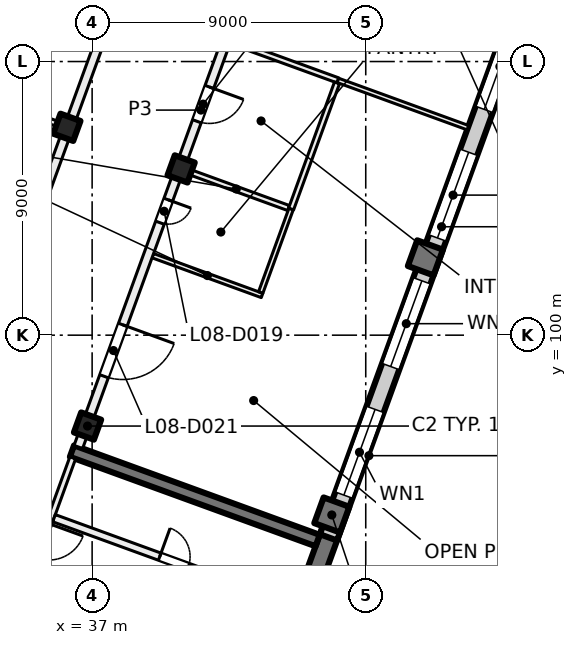
"""IFC4 building model, lengths in metres.
Left out: names, types, materials, properties, quantities, classifications, styles, units other than length and angle.
Written with IfcOpenShell. Run it as: python <this file> out.ifc"""

import sys

from ifc_helpers import new_model, si_unit, direction, frame, frame_2d, origin, origin_2d, place, context, subcontext, project, spatial, rectangle, extrude, element, fill, save


model = new_model("IFC4")
c1 = context("Model", 3, precision=1e-05, world=origin(), true_north=direction((0.0, 1.0)))
c2 = subcontext(c1, "Body", "Model", "MODEL_VIEW")
j1 = project(units=[si_unit("LENGTHUNIT", "METRE"), si_unit("PLANEANGLEUNIT", "RADIAN")], contexts=[c1])
p1 = place(None, origin())
s1 = spatial("IfcSite", under=j1, at=p1, CompositionType="ELEMENT")
p2 = place(p1, origin())
s2 = spatial("IfcBuilding", under=s1, at=p2, CompositionType="ELEMENT")
p3 = place(p2, frame((0.0, 0.0, 39.5)))
s3 = spatial("IfcBuildingStorey", under=s2, at=p3, CompositionType="ELEMENT", Elevation=39.5)
for number, where, z_axis, x_axis in (
    (1, (39.927, 105.468, 0.0), (0.0, 0.0, 1.0), (-0.342, -0.94, 0.0)),
    (2, (36.849, 97.011, 0.0), (0.0, 0.0, 1.0), (-0.342, -0.94, 0.0)),
    (3, (36.169, 106.836, 0.0), (0.0, 0.0, 1.0), (-0.342, -0.94, 0.0)),
):
    element("IfcColumn", number, at=place(p3, frame(where, z_axis=z_axis, x_axis=x_axis)), inside=s3, PredefinedType="COLUMN", context=c2, shape_type="SweptSolid", body=[
        extrude(rectangle(XDim=0.7, YDim=0.7, at=origin_2d()), origin(), (0.0, 0.0, 1.0), 4.0),
    ])
for number, where, z_axis, x_axis in (
    (4, (47.962, 102.544, 0.0), (0.0, 0.0, 1.0), (-0.342, -0.94, 0.0)),
    (5, (44.884, 94.087, 0.0), (0.0, 0.0, 1.0), (-0.342, -0.94, 0.0)),
):
    element("IfcColumn", number, at=place(p3, frame(where, z_axis=z_axis, x_axis=x_axis)), inside=s3, PredefinedType="COLUMN", context=c2, shape_type="SweptSolid", body=[
        extrude(rectangle(XDim=0.9, YDim=0.9, at=origin_2d()), origin(), (0.0, 0.0, 1.0), 4.0),
    ])
p4 = place(p3, frame((41.827, 85.249, 0.0), z_axis=(0.0, 0.0, 1.0), x_axis=(0.342016162452, 0.939694069696, 0.0)))
e6 = element("IfcWall", 6, at=p4, inside=s3, PredefinedType="SHEAR", context=c2, shape_type="SweptSolid", body=[
    extrude(rectangle(XDim=8.9, YDim=0.6, at=frame_2d((4.45, 0.0))), origin(), (0.0, 0.0, 1.0), 4.0),
])
p5 = place(p3, frame((44.418, 93.245, 0.0), z_axis=(0.0, 0.0, 1.0), x_axis=(-0.93969060187, 0.342025690201, 0.0)))
e7 = element("IfcWall", 7, at=p5, inside=s3, PredefinedType="SHEAR", context=c2, shape_type="SweptSolid", body=[
    extrude(rectangle(XDim=8.6, YDim=0.4, at=frame_2d((4.3, 0.0))), origin(), (0.0, 0.0, 1.0), 4.0),
])
p6 = place(p3, frame((52.212, 113.783, 0.0), z_axis=(0.0, 0.0, 1.0), x_axis=(-0.34202521188, -0.939690775968, 0.0)))
e8 = element("IfcWall", 8, at=p6, inside=s3, PredefinedType="SOLIDWALL", context=c2, shape_type="SweptSolid", body=[
    extrude(rectangle(XDim=21.745, YDim=0.6, at=frame_2d((10.873, 0.0))), origin(), (0.0, 0.0, 1.0), 3.625),
])
p7 = place(p6, frame((3.765, 0.0, 0.9)))
e9 = element("IfcOpeningElement", 9, at=p7, cuts=e8, PredefinedType="OPENING", context=c2, shape_type="SweptSolid", body=[
    extrude(rectangle(XDim=3.0, YDim=2.4, at=frame_2d((1.5, 1.2))), frame((0.0, 0.31, 0.0), z_axis=(0.0, -1.0, 0.0), x_axis=(1.0, 0.0, 0.0)), (0.0, 0.0, 1.0), 0.62),
])
p8 = place(p6, frame((8.265, 0.0, 0.9)))
e10 = element("IfcOpeningElement", 10, at=p8, cuts=e8, PredefinedType="OPENING", context=c2, shape_type="SweptSolid", body=[
    extrude(rectangle(XDim=3.0, YDim=2.4, at=frame_2d((1.5, 1.2))), frame((0.0, 0.31, 0.0), z_axis=(0.0, -1.0, 0.0), x_axis=(1.0, 0.0, 0.0)), (0.0, 0.0, 1.0), 0.62),
])
p9 = place(p6, frame((12.765, 0.0, 0.9)))
e11 = element("IfcOpeningElement", 11, at=p9, cuts=e8, PredefinedType="OPENING", context=c2, shape_type="SweptSolid", body=[
    extrude(rectangle(XDim=3.0, YDim=2.4, at=frame_2d((1.5, 1.2))), frame((0.0, 0.31, 0.0), z_axis=(0.0, -1.0, 0.0), x_axis=(1.0, 0.0, 0.0)), (0.0, 0.0, 1.0), 0.62),
])
p10 = place(p6, frame((17.265, 0.0, 0.9)))
e12 = element("IfcOpeningElement", 12, at=p10, cuts=e8, PredefinedType="OPENING", context=c2, shape_type="SweptSolid", body=[
    extrude(rectangle(XDim=3.0, YDim=2.4, at=frame_2d((1.5, 1.2))), frame((0.0, 0.31, 0.0), z_axis=(0.0, -1.0, 0.0), x_axis=(1.0, 0.0, 0.0)), (0.0, 0.0, 1.0), 0.62),
])
p11 = place(p3, frame((24.666, 100.669, 0.0), z_axis=(0.0, 0.0, 1.0), x_axis=(0.34201964167, 0.939692803373, 0.0)))
e13 = element("IfcWall", 13, at=p11, inside=s3, PredefinedType="SOLIDWALL", context=c2, shape_type="SweptSolid", body=[
    extrude(rectangle(XDim=32.884, YDim=0.6, at=frame_2d((16.442, 0.0))), origin(), (0.0, 0.0, 1.0), 3.625),
])
p12 = place(p11, frame((1.48, 0.0, 0.9)))
e14 = element("IfcOpeningElement", 14, at=p12, cuts=e13, PredefinedType="OPENING", context=c2, shape_type="SweptSolid", body=[
    extrude(rectangle(XDim=3.0, YDim=2.4, at=frame_2d((1.5, 1.2))), frame((0.0, 0.31, 0.0), z_axis=(0.0, -1.0, 0.0), x_axis=(1.0, 0.0, 0.0)), (0.0, 0.0, 1.0), 0.62),
])
p13 = place(p11, frame((5.98, 0.0, 0.9)))
e15 = element("IfcOpeningElement", 15, at=p13, cuts=e13, PredefinedType="OPENING", context=c2, shape_type="SweptSolid", body=[
    extrude(rectangle(XDim=3.0, YDim=2.4, at=frame_2d((1.5, 1.2))), frame((0.0, 0.31, 0.0), z_axis=(0.0, -1.0, 0.0), x_axis=(1.0, 0.0, 0.0)), (0.0, 0.0, 1.0), 0.62),
])
p14 = place(p11, frame((10.48, 0.0, 0.9)))
e16 = element("IfcOpeningElement", 16, at=p14, cuts=e13, PredefinedType="OPENING", context=c2, shape_type="SweptSolid", body=[
    extrude(rectangle(XDim=3.0, YDim=2.4, at=frame_2d((1.5, 1.2))), frame((0.0, 0.31, 0.0), z_axis=(0.0, -1.0, 0.0), x_axis=(1.0, 0.0, 0.0)), (0.0, 0.0, 1.0), 0.62),
])
p15 = place(p11, frame((14.98, 0.0, 0.9)))
e17 = element("IfcOpeningElement", 17, at=p15, cuts=e13, PredefinedType="OPENING", context=c2, shape_type="SweptSolid", body=[
    extrude(rectangle(XDim=3.0, YDim=2.4, at=frame_2d((1.5, 1.2))), frame((0.0, 0.31, 0.0), z_axis=(0.0, -1.0, 0.0), x_axis=(1.0, 0.0, 0.0)), (0.0, 0.0, 1.0), 0.62),
])
p16 = place(p11, frame((19.48, 0.0, 0.9)))
e18 = element("IfcOpeningElement", 18, at=p16, cuts=e13, PredefinedType="OPENING", context=c2, shape_type="SweptSolid", body=[
    extrude(rectangle(XDim=3.0, YDim=2.4, at=frame_2d((1.5, 1.2))), frame((0.0, 0.31, 0.0), z_axis=(0.0, -1.0, 0.0), x_axis=(1.0, 0.0, 0.0)), (0.0, 0.0, 1.0), 0.62),
])
p17 = place(p11, frame((23.98, 0.0, 0.9)))
e19 = element("IfcOpeningElement", 19, at=p17, cuts=e13, PredefinedType="OPENING", context=c2, shape_type="SweptSolid", body=[
    extrude(rectangle(XDim=3.0, YDim=2.4, at=frame_2d((1.5, 1.2))), frame((0.0, 0.31, 0.0), z_axis=(0.0, -1.0, 0.0), x_axis=(1.0, 0.0, 0.0)), (0.0, 0.0, 1.0), 0.62),
])
p18 = place(p11, frame((28.48, 0.0, 0.9)))
e20 = element("IfcOpeningElement", 20, at=p18, cuts=e13, PredefinedType="OPENING", context=c2, shape_type="SweptSolid", body=[
    extrude(rectangle(XDim=3.0, YDim=2.4, at=frame_2d((1.5, 1.2))), frame((0.0, 0.31, 0.0), z_axis=(0.0, -1.0, 0.0), x_axis=(1.0, 0.0, 0.0)), (0.0, 0.0, 1.0), 0.62),
])
p19 = place(p3, frame((36.362, 95.964, 0.0), z_axis=(0.0, 0.0, 1.0), x_axis=(-0.341995824804, -0.939701471648, 0.0)))
e21 = element("IfcWall", 21, at=p19, inside=s3, PredefinedType="PARTITIONING", context=c2, shape_type="SweptSolid", body=[
    extrude(rectangle(XDim=3.8, YDim=0.2, at=frame_2d((1.9, 0.0))), origin(), (0.0, 0.0, 1.0), 3.625),
])
p20 = place(p19, frame((2.3, 0.0, 0.0)))
e22 = element("IfcOpeningElement", 22, at=p20, cuts=e21, PredefinedType="OPENING", context=c2, shape_type="SweptSolid", body=[
    extrude(rectangle(XDim=1.2, YDim=2.1, at=frame_2d((0.6, 1.05))), frame((0.0, 0.11, 0.0), z_axis=(0.0, -1.0, 0.0), x_axis=(1.0, 0.0, 0.0)), (0.0, 0.0, 1.0), 0.22),
])
p21 = place(p3, frame((35.19, 92.453, 0.0), z_axis=(0.0, 0.0, 1.0), x_axis=(0.939691552312, -0.342023078919, 0.0)))
e23 = element("IfcWall", 23, at=p21, inside=s3, PredefinedType="PARTITIONING", context=c2, shape_type="SweptSolid", body=[
    extrude(rectangle(XDim=8.4, YDim=0.2, at=frame_2d((4.2, 0.0))), origin(), (0.0, 0.0, 1.0), 3.625),
])
p22 = place(p21, frame((5.25, 0.0, 0.0)))
e24 = element("IfcOpeningElement", 24, at=p22, cuts=e23, PredefinedType="OPENING", context=c2, shape_type="SweptSolid", body=[
    extrude(rectangle(XDim=1.5, YDim=2.1, at=frame_2d((0.75, 1.05))), frame((0.0, 0.11, 0.0), z_axis=(0.0, -1.0, 0.0), x_axis=(1.0, 0.0, 0.0)), (0.0, 0.0, 1.0), 0.22),
])
p23 = place(p3, frame((35.746, 93.98, 0.0), z_axis=(0.0, 0.0, 1.0), x_axis=(0.939691552312, -0.342023078919, 0.0)))
e25 = element("IfcWall", 25, at=p23, inside=s3, PredefinedType="PARTITIONING", context=c2, shape_type="SweptSolid", body=[
    extrude(rectangle(XDim=8.4, YDim=0.25, at=frame_2d((4.2, 0.0))), origin(), (0.0, 0.0, 1.0), 3.625),
])
p24 = place(p23, frame((3.7, 0.0, 0.0)))
e26 = element("IfcOpeningElement", 26, at=p24, cuts=e25, PredefinedType="OPENING", context=c2, shape_type="SweptSolid", body=[
    extrude(rectangle(XDim=1.0, YDim=2.1, at=frame_2d((0.5, 1.05))), frame((0.0, 0.135, 0.0), z_axis=(0.0, -1.0, 0.0), x_axis=(1.0, 0.0, 0.0)), (0.0, 0.0, 1.0), 0.27),
])
p25 = place(p3, frame((28.275, 109.709, 0.0), z_axis=(0.0, 0.0, 1.0), x_axis=(0.939697205528, -0.342007546586, 0.0)))
e27 = element("IfcWall", 27, at=p25, inside=s3, PredefinedType="PARTITIONING", context=c2, shape_type="SweptSolid", body=[
    extrude(rectangle(XDim=8.301, YDim=0.175, at=frame_2d((4.15, 0.0))), origin(), (0.0, 0.0, 1.0), 3.625),
])
p26 = place(p3, frame((32.881, 97.657, 0.0), z_axis=(0.0, 0.0, 1.0), x_axis=(0.342017360004, 0.939693633828, 0.0)))
e28 = element("IfcWall", 28, at=p26, inside=s3, PredefinedType="PARTITIONING", context=c2, shape_type="SweptSolid", body=[
    extrude(rectangle(XDim=34.516, YDim=0.3, at=frame_2d((17.258, 0.0))), origin(), (0.0, 0.0, 1.0), 3.625),
])
p27 = place(p26, frame((4.275, 0.0, 0.0)))
e29 = element("IfcOpeningElement", 29, at=p27, cuts=e28, PredefinedType="OPENING", context=c2, shape_type="SweptSolid", body=[
    extrude(rectangle(XDim=1.2, YDim=2.1, at=frame_2d((0.6, 1.05))), frame((0.0, 0.16, 0.0), z_axis=(0.0, -1.0, 0.0), x_axis=(1.0, 0.0, 0.0)), (0.0, 0.0, 1.0), 0.32),
])
p28 = place(p26, frame((16.0, 0.0, 0.0)))
e30 = element("IfcOpeningElement", 30, at=p28, cuts=e28, PredefinedType="OPENING", context=c2, shape_type="SweptSolid", body=[
    extrude(rectangle(XDim=1.0, YDim=2.1, at=frame_2d((0.5, 1.05))), frame((0.0, 0.16, 0.0), z_axis=(0.0, -1.0, 0.0), x_axis=(1.0, 0.0, 0.0)), (0.0, 0.0, 1.0), 0.32),
])
p29 = place(p26, frame((21.5, 0.0, 0.0)))
e31 = element("IfcOpeningElement", 31, at=p29, cuts=e28, PredefinedType="OPENING", context=c2, shape_type="SweptSolid", body=[
    extrude(rectangle(XDim=1.0, YDim=2.1, at=frame_2d((0.5, 1.05))), frame((0.0, 0.16, 0.0), z_axis=(0.0, -1.0, 0.0), x_axis=(1.0, 0.0, 0.0)), (0.0, 0.0, 1.0), 0.32),
])
p30 = place(p3, frame((41.561, 109.663, 0.0), z_axis=(0.0, 0.0, 1.0), x_axis=(0.939610777088, -0.34224492338, 0.0)))
e32 = element("IfcWall", 32, at=p30, inside=s3, PredefinedType="PARTITIONING", context=c2, shape_type="SweptSolid", body=[
    extrude(rectangle(XDim=3.749, YDim=0.175, at=frame_2d((1.875, 0.0))), origin(), (0.0, 0.0, 1.0), 3.625),
])
p31 = place(p3, frame((42.589, 101.306, 0.0), z_axis=(0.0, 0.0, 1.0), x_axis=(-0.939610657605, 0.342245251415, 0.0)))
e33 = element("IfcWall", 33, at=p31, inside=s3, PredefinedType="PARTITIONING", context=c2, shape_type="SweptSolid", body=[
    extrude(rectangle(XDim=3.825, YDim=0.15, at=frame_2d((1.913, 0.0))), origin(), (0.0, 0.0, 1.0), 3.625),
])
p32 = place(p3, frame((43.463, 104.181, 0.0), z_axis=(0.0, 0.0, 1.0), x_axis=(-0.939655178262, 0.342122998299, 0.0)))
e34 = element("IfcWall", 34, at=p32, inside=s3, PredefinedType="PARTITIONING", context=c2, shape_type="SweptSolid", body=[
    extrude(rectangle(XDim=3.663, YDim=0.175, at=frame_2d((1.832, 0.0))), origin(), (0.0, 0.0, 1.0), 3.625),
])
p33 = place(p3, frame((43.545, 104.151, 0.0), z_axis=(0.0, 0.0, 1.0), x_axis=(-0.341877092744, -0.93974467461, 0.0)))
e35 = element("IfcWall", 35, at=p33, inside=s3, PredefinedType="PARTITIONING", context=c2, shape_type="SweptSolid", body=[
    extrude(rectangle(XDim=2.925, YDim=0.15, at=frame_2d((1.462, 0.0))), origin(), (0.0, 0.0, 1.0), 3.625),
])
p34 = place(p3, frame((44.612, 118.483, 0.0), z_axis=(0.0, 0.0, 1.0), x_axis=(-0.342043123066, -0.939684256526, 0.0)))
e36 = element("IfcWall", 36, at=p34, inside=s3, PredefinedType="PARTITIONING", context=c2, shape_type="SweptSolid", body=[
    extrude(rectangle(XDim=23.582, YDim=0.3, at=frame_2d((11.791, 0.0))), origin(), (0.0, 0.0, 1.0), 3.625),
])
p35 = place(p34, frame((14.932, 0.0, 0.0)))
e37 = element("IfcOpeningElement", 37, at=p35, cuts=e36, PredefinedType="OPENING", context=c2, shape_type="SweptSolid", body=[
    extrude(rectangle(XDim=0.8, YDim=2.1, at=frame_2d((0.4, 1.05))), frame((0.0, 0.16, 0.0), z_axis=(0.0, -1.0, 0.0), x_axis=(1.0, 0.0, 0.0)), (0.0, 0.0, 1.0), 0.32),
])
p36 = place(p34, frame((10.982, 0.0, 0.0)))
e38 = element("IfcOpeningElement", 38, at=p36, cuts=e36, PredefinedType="OPENING", context=c2, shape_type="SweptSolid", body=[
    extrude(rectangle(XDim=1.2, YDim=2.1, at=frame_2d((0.6, 1.05))), frame((0.0, 0.16, 0.0), z_axis=(0.0, -1.0, 0.0), x_axis=(1.0, 0.0, 0.0)), (0.0, 0.0, 1.0), 0.32),
])
p37 = place(p34, frame((19.307, 0.0, 0.0)))
e39 = element("IfcOpeningElement", 39, at=p37, cuts=e36, PredefinedType="OPENING", context=c2, shape_type="SweptSolid", body=[
    extrude(rectangle(XDim=1.8, YDim=2.1, at=frame_2d((0.9, 1.05))), frame((0.0, 0.16, 0.0), z_axis=(0.0, -1.0, 0.0), x_axis=(1.0, 0.0, 0.0)), (0.0, 0.0, 1.0), 0.32),
])
p38 = place(p34, frame((5.756, 0.0, 0.0)))
e40 = element("IfcOpeningElement", 40, at=p38, cuts=e36, PredefinedType="OPENING", context=c2, shape_type="SweptSolid", body=[
    extrude(rectangle(XDim=1.8, YDim=2.1, at=frame_2d((0.9, 1.05))), frame((0.0, 0.16, 0.0), z_axis=(0.0, -1.0, 0.0), x_axis=(1.0, 0.0, 0.0)), (0.0, 0.0, 1.0), 0.32),
])
p39 = place(p3, frame((45.054, 108.298, 0.0), z_axis=(0.0, 0.0, 1.0), x_axis=(-0.34193405199, -0.939723951004, 0.0)))
e41 = element("IfcWall", 41, at=p39, inside=s3, PredefinedType="PARTITIONING", context=c2, shape_type="SweptSolid", body=[
    extrude(rectangle(XDim=4.413, YDim=0.175, at=frame_2d((2.207, 0.0))), origin(), (0.0, 0.0, 1.0), 3.625),
])
p40 = place(p3, frame((45.084, 108.38, 0.0), z_axis=(0.0, 0.0, 1.0), x_axis=(0.93972604571, -0.341928295136, 0.0)))
e42 = element("IfcWall", 42, at=p40, inside=s3, PredefinedType="PARTITIONING", context=c2, shape_type="SweptSolid", body=[
    extrude(rectangle(XDim=4.55, YDim=0.15, at=frame_2d((2.275, 0.0))), origin(), (0.0, 0.0, 1.0), 3.625),
])
p41 = place(p7, origin())
e43 = element("IfcWindow", 43, at=p41, inside=s3, PartitioningType="SINGLE_PANEL", PredefinedType="WINDOW", context=c2, shape_type="SweptSolid", body=[
    extrude(rectangle(XDim=3.0, YDim=2.4, at=frame_2d((1.5, 1.2))), frame((0.0, 0.03, 0.0), z_axis=(0.0, -1.0, 0.0), x_axis=(1.0, 0.0, 0.0)), (0.0, 0.0, 1.0), 0.06),
])
fill(e9, e43)
p42 = place(p8, origin())
e44 = element("IfcWindow", 44, at=p42, inside=s3, PartitioningType="SINGLE_PANEL", PredefinedType="WINDOW", context=c2, shape_type="SweptSolid", body=[
    extrude(rectangle(XDim=3.0, YDim=2.4, at=frame_2d((1.5, 1.2))), frame((0.0, 0.03, 0.0), z_axis=(0.0, -1.0, 0.0), x_axis=(1.0, 0.0, 0.0)), (0.0, 0.0, 1.0), 0.06),
])
fill(e10, e44)
p43 = place(p9, origin())
e45 = element("IfcWindow", 45, at=p43, inside=s3, PartitioningType="SINGLE_PANEL", PredefinedType="WINDOW", context=c2, shape_type="SweptSolid", body=[
    extrude(rectangle(XDim=3.0, YDim=2.4, at=frame_2d((1.5, 1.2))), frame((0.0, 0.03, 0.0), z_axis=(0.0, -1.0, 0.0), x_axis=(1.0, 0.0, 0.0)), (0.0, 0.0, 1.0), 0.06),
])
fill(e11, e45)
p44 = place(p10, origin())
e46 = element("IfcWindow", 46, at=p44, inside=s3, PartitioningType="SINGLE_PANEL", PredefinedType="WINDOW", context=c2, shape_type="SweptSolid", body=[
    extrude(rectangle(XDim=3.0, YDim=2.4, at=frame_2d((1.5, 1.2))), frame((0.0, 0.03, 0.0), z_axis=(0.0, -1.0, 0.0), x_axis=(1.0, 0.0, 0.0)), (0.0, 0.0, 1.0), 0.06),
])
fill(e12, e46)
p45 = place(p24, origin())
e47 = element("IfcDoor", 47, at=p45, inside=s3, OperationType="SINGLE_SWING_RIGHT", PredefinedType="DOOR", context=c2, shape_type="SweptSolid", body=[
    extrude(rectangle(XDim=1.0, YDim=2.1, at=frame_2d((0.5, 1.05))), frame((0.0, 0.025, 0.0), z_axis=(0.0, -1.0, 0.0), x_axis=(1.0, 0.0, 0.0)), (0.0, 0.0, 1.0), 0.05),
])
fill(e26, e47)
p46 = place(p35, origin())
e48 = element("IfcDoor", 48, at=p46, inside=s3, OperationType="SINGLE_SWING_LEFT", PredefinedType="DOOR", context=c2, shape_type="SweptSolid", body=[
    extrude(rectangle(XDim=0.8, YDim=2.1, at=frame_2d((0.4, 1.05))), frame((0.0, 0.025, 0.0), z_axis=(0.0, -1.0, 0.0), x_axis=(1.0, 0.0, 0.0)), (0.0, 0.0, 1.0), 0.05),
])
fill(e37, e48)
p47 = place(p36, origin())
e49 = element("IfcDoor", 49, at=p47, inside=s3, OperationType="DOUBLE_DOOR_SINGLE_SWING", PredefinedType="DOOR", context=c2, shape_type="SweptSolid", body=[
    extrude(rectangle(XDim=1.2, YDim=2.1, at=frame_2d((0.6, 1.05))), frame((0.0, 0.025, 0.0), z_axis=(0.0, -1.0, 0.0), x_axis=(1.0, 0.0, 0.0)), (0.0, 0.0, 1.0), 0.05),
])
fill(e38, e49)
p48 = place(p37, origin())
e50 = element("IfcDoor", 50, at=p48, inside=s3, OperationType="DOUBLE_DOOR_SINGLE_SWING", PredefinedType="DOOR", context=c2, shape_type="SweptSolid", body=[
    extrude(rectangle(XDim=1.8, YDim=2.1, at=frame_2d((0.9, 1.05))), frame((0.0, 0.025, 0.0), z_axis=(0.0, -1.0, 0.0), x_axis=(1.0, 0.0, 0.0)), (0.0, 0.0, 1.0), 0.05),
])
fill(e39, e50)
save(model, sys.argv[1])
